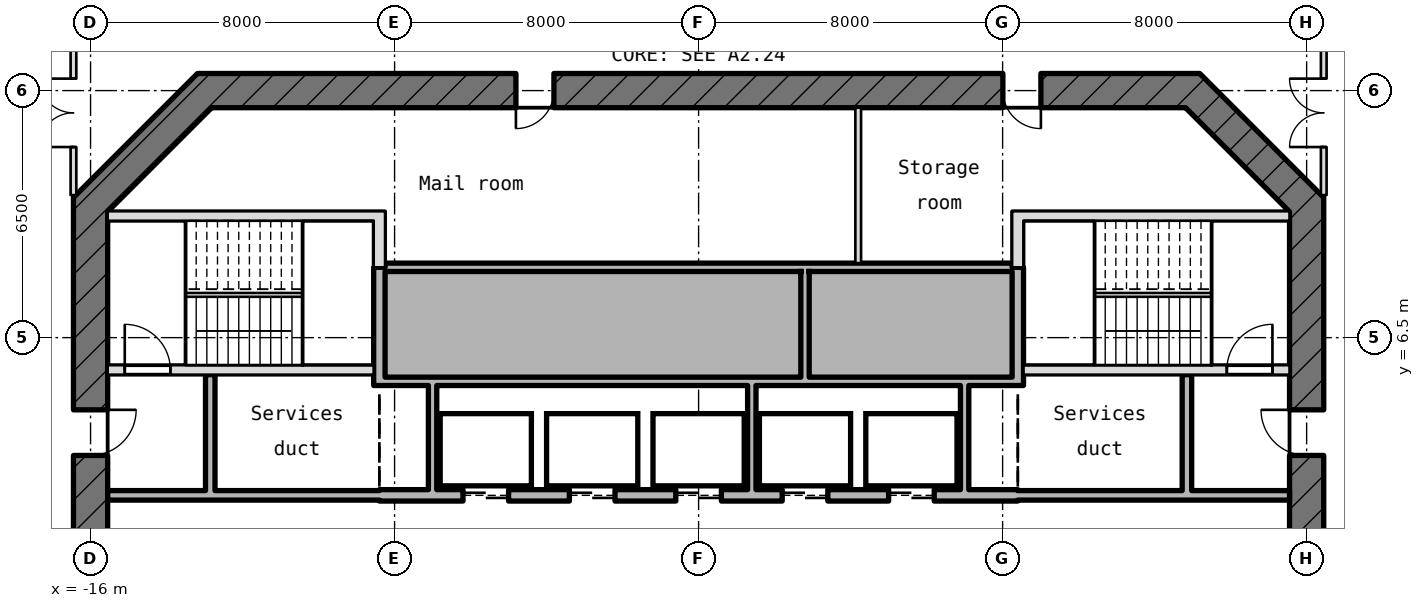
"""IFC4 building model, lengths in metres.
Left out: names, types, materials, properties, quantities, classifications, styles, units other than length and angle.
Written with IfcOpenShell. Run it as: python <this file> out.ifc"""

import sys

from ifc_helpers import new_model, si_unit, direction, frame, frame_2d, origin, place, context, subcontext, project, spatial, rectangle, extrude, element, fill, save


model = new_model("IFC4")
c1 = context("Model", 3, precision=1e-05, world=origin(), true_north=direction((0.0, 1.0)))
c2 = subcontext(c1, "Body", "Model", "MODEL_VIEW")
j1 = project(units=[si_unit("LENGTHUNIT", "METRE"), si_unit("PLANEANGLEUNIT", "RADIAN")], contexts=[c1])
p1 = place(None, origin())
s1 = spatial("IfcSite", under=j1, at=p1, CompositionType="ELEMENT")
p2 = place(p1, origin())
s2 = spatial("IfcBuilding", under=s1, at=p2, CompositionType="ELEMENT")
p3 = place(p2, frame((0.0, 0.0, 260.65)))
s3 = spatial("IfcBuildingStorey", under=s2, at=p3, CompositionType="ELEMENT", Elevation=260.65)
p4 = place(p3, frame((-14.512, 19.911, 0.0), z_axis=(0.0, 0.0, 1.0), x_axis=(-0.76563894676, -0.643270552104, 0.0)))
e1 = element("IfcWall", 1, at=p4, inside=s3, PredefinedType="SOLIDWALL", context=c2, shape_type="SweptSolid", body=[
    extrude(rectangle(XDim=10.58, YDim=0.3, at=frame_2d((5.29, 0.0))), origin(), (0.0, 0.0, 1.0), 3.97),
])
p5 = place(p4, frame((6.88, 0.0, 0.0)))
e2 = element("IfcOpeningElement", 2, at=p5, cuts=e1, PredefinedType="OPENING", context=c2, shape_type="SweptSolid", body=[
    extrude(rectangle(XDim=1.8, YDim=2.4, at=frame_2d((0.9, 1.2))), frame((0.0, 0.16, 0.0), z_axis=(0.0, -1.0, 0.0), x_axis=(1.0, 0.0, 0.0)), (0.0, 0.0, 1.0), 0.32),
])
p6 = place(p4, frame((4.28, 0.0, 0.9)))
e3 = element("IfcOpeningElement", 3, at=p6, cuts=e1, PredefinedType="OPENING", context=c2, shape_type="SweptSolid", body=[
    extrude(rectangle(XDim=2.0, YDim=1.5, at=frame_2d((1.0, 0.75))), frame((0.0, 0.16, 0.0), z_axis=(0.0, -1.0, 0.0), x_axis=(1.0, 0.0, 0.0)), (0.0, 0.0, 1.0), 0.32),
])
p7 = place(p3, frame((16.0, -10.186, -0.18), z_axis=(0.0, 0.0, 1.0), x_axis=(0.0, 1.0, 0.0)))
e4 = element("IfcWall", 4, at=p7, inside=s3, PredefinedType="SHEAR", context=c2, shape_type="SweptSolid", body=[
    extrude(rectangle(XDim=20.373, YDim=0.9, at=frame_2d((10.186, 0.0))), origin(), (0.0, 0.0, 1.0), 4.15),
])
p8 = place(p7, frame((8.986, 0.0, 0.18)))
e5 = element("IfcOpeningElement", 5, at=p8, cuts=e4, PredefinedType="OPENING", context=c2, shape_type="SweptSolid", body=[
    extrude(rectangle(XDim=2.4, YDim=2.1, at=frame_2d((1.2, 1.05))), frame((0.0, 0.46, 0.0), z_axis=(0.0, -1.0, 0.0), x_axis=(1.0, 0.0, 0.0)), (0.0, 0.0, 1.0), 0.92),
])
p9 = place(p7, frame((13.586, 0.0, 0.18)))
e6 = element("IfcOpeningElement", 6, at=p9, cuts=e4, PredefinedType="OPENING", context=c2, shape_type="SweptSolid", body=[
    extrude(rectangle(XDim=1.2, YDim=2.1, at=frame_2d((0.6, 1.05))), frame((0.0, 0.46, 0.0), z_axis=(0.0, -1.0, 0.0), x_axis=(1.0, 0.0, 0.0)), (0.0, 0.0, 1.0), 0.92),
])
p10 = place(p3, frame((16.132, 9.868, -0.18), z_axis=(0.0, 0.0, 1.0), x_axis=(-0.707106781187, 0.707106781187, 0.0)))
e7 = element("IfcWall", 7, at=p10, inside=s3, PredefinedType="SHEAR", context=c2, shape_type="SweptSolid", body=[
    extrude(rectangle(XDim=4.615, YDim=0.9, at=frame_2d((2.308, 0.0))), origin(), (0.0, 0.0, 1.0), 4.15),
])
p11 = place(p3, frame((13.186, 13.0, -0.18), z_axis=(0.0, 0.0, 1.0), x_axis=(-1.0, 0.0, 0.0)))
e8 = element("IfcWall", 8, at=p11, inside=s3, PredefinedType="SHEAR", context=c2, shape_type="SweptSolid", body=[
    extrude(rectangle(XDim=26.373, YDim=0.9, at=frame_2d((13.186, 0.0))), origin(), (0.0, 0.0, 1.0), 4.15),
])
p12 = place(p11, frame((16.993, 0.0, 0.18)))
e9 = element("IfcOpeningElement", 9, at=p12, cuts=e8, PredefinedType="OPENING", context=c2, shape_type="SweptSolid", body=[
    extrude(rectangle(XDim=1.0, YDim=2.1, at=frame_2d((0.5, 1.05))), frame((0.0, 0.46, 0.0), z_axis=(0.0, -1.0, 0.0), x_axis=(1.0, 0.0, 0.0)), (0.0, 0.0, 1.0), 0.92),
])
p13 = place(p11, frame((4.179, 0.0, 0.18)))
e10 = element("IfcOpeningElement", 10, at=p13, cuts=e8, PredefinedType="OPENING", context=c2, shape_type="SweptSolid", body=[
    extrude(rectangle(XDim=1.0, YDim=2.1, at=frame_2d((0.5, 1.05))), frame((0.0, 0.46, 0.0), z_axis=(0.0, -1.0, 0.0), x_axis=(1.0, 0.0, 0.0)), (0.0, 0.0, 1.0), 0.92),
])
p14 = place(p3, frame((-12.868, 13.132, -0.18), z_axis=(0.0, 0.0, 1.0), x_axis=(-0.707106781187, -0.707106781187, 0.0)))
e11 = element("IfcWall", 11, at=p14, inside=s3, PredefinedType="SHEAR", context=c2, shape_type="SweptSolid", body=[
    extrude(rectangle(XDim=4.615, YDim=0.9, at=frame_2d((2.308, 0.0))), origin(), (0.0, 0.0, 1.0), 4.15),
])
p15 = place(p3, frame((-16.0, 10.186, -0.18), z_axis=(0.0, 0.0, 1.0), x_axis=(0.0, -1.0, 0.0)))
e12 = element("IfcWall", 12, at=p15, inside=s3, PredefinedType="SHEAR", context=c2, shape_type="SweptSolid", body=[
    extrude(rectangle(XDim=20.373, YDim=0.9, at=frame_2d((10.186, 0.0))), origin(), (0.0, 0.0, 1.0), 4.15),
])
p16 = place(p15, frame((8.986, 0.0, 0.18)))
e13 = element("IfcOpeningElement", 13, at=p16, cuts=e12, PredefinedType="OPENING", context=c2, shape_type="SweptSolid", body=[
    extrude(rectangle(XDim=2.4, YDim=2.1, at=frame_2d((1.2, 1.05))), frame((0.0, 0.46, 0.0), z_axis=(0.0, -1.0, 0.0), x_axis=(1.0, 0.0, 0.0)), (0.0, 0.0, 1.0), 0.92),
])
p17 = place(p15, frame((5.586, 0.0, 0.18)))
e14 = element("IfcOpeningElement", 14, at=p17, cuts=e12, PredefinedType="OPENING", context=c2, shape_type="SweptSolid", body=[
    extrude(rectangle(XDim=1.2, YDim=2.1, at=frame_2d((0.6, 1.05))), frame((0.0, 0.46, 0.0), z_axis=(0.0, -1.0, 0.0), x_axis=(1.0, 0.0, 0.0)), (0.0, 0.0, 1.0), 0.92),
])
p18 = place(p3, frame((-15.55, 2.35, 0.0), z_axis=(0.0, 0.0, 1.0), x_axis=(1.0, 0.0, 0.0)))
e15 = element("IfcWall", 15, at=p18, inside=s3, PredefinedType="STANDARD", context=c2, shape_type="SweptSolid", body=[
    extrude(rectangle(XDim=7.15, YDim=0.25, at=frame_2d((3.575, 0.0))), origin(), (0.0, 0.0, 1.0), 3.97),
])
p19 = place(p3, frame((-8.4, 2.35, -0.18), z_axis=(0.0, 0.0, 1.0), x_axis=(1.0, 0.0, 0.0)))
e16 = element("IfcWall", 16, at=p19, inside=s3, PredefinedType="SHEAR", context=c2, shape_type="SweptSolid", body=[
    extrude(rectangle(XDim=16.8, YDim=0.3, at=frame_2d((8.4, 0.0))), origin(), (0.0, 0.0, 1.0), 4.15),
])
p20 = place(p19, frame((2.2, 0.0, 0.18)))
e17 = element("IfcOpeningElement", 17, at=p20, cuts=e16, PredefinedType="OPENING", context=c2, shape_type="SweptSolid", body=[
    extrude(rectangle(XDim=1.2, YDim=2.1, at=frame_2d((0.6, 1.05))), frame((0.0, 0.16, 0.0), z_axis=(0.0, -1.0, 0.0), x_axis=(1.0, 0.0, 0.0)), (0.0, 0.0, 1.0), 0.32),
])
p21 = place(p19, frame((5.0, 0.0, 0.18)))
e18 = element("IfcOpeningElement", 18, at=p21, cuts=e16, PredefinedType="OPENING", context=c2, shape_type="SweptSolid", body=[
    extrude(rectangle(XDim=1.2, YDim=2.1, at=frame_2d((0.6, 1.05))), frame((0.0, 0.16, 0.0), z_axis=(0.0, -1.0, 0.0), x_axis=(1.0, 0.0, 0.0)), (0.0, 0.0, 1.0), 0.32),
])
p22 = place(p19, frame((7.8, 0.0, 0.18)))
e19 = element("IfcOpeningElement", 19, at=p22, cuts=e16, PredefinedType="OPENING", context=c2, shape_type="SweptSolid", body=[
    extrude(rectangle(XDim=1.2, YDim=2.1, at=frame_2d((0.6, 1.05))), frame((0.0, 0.16, 0.0), z_axis=(0.0, -1.0, 0.0), x_axis=(1.0, 0.0, 0.0)), (0.0, 0.0, 1.0), 0.32),
])
p23 = place(p19, frame((10.6, 0.0, 0.18)))
e20 = element("IfcOpeningElement", 20, at=p23, cuts=e16, PredefinedType="OPENING", context=c2, shape_type="SweptSolid", body=[
    extrude(rectangle(XDim=1.2, YDim=2.1, at=frame_2d((0.6, 1.05))), frame((0.0, 0.16, 0.0), z_axis=(0.0, -1.0, 0.0), x_axis=(1.0, 0.0, 0.0)), (0.0, 0.0, 1.0), 0.32),
])
p24 = place(p19, frame((13.4, 0.0, 0.18)))
e21 = element("IfcOpeningElement", 21, at=p24, cuts=e16, PredefinedType="OPENING", context=c2, shape_type="SweptSolid", body=[
    extrude(rectangle(XDim=1.2, YDim=2.1, at=frame_2d((0.6, 1.05))), frame((0.0, 0.16, 0.0), z_axis=(0.0, -1.0, 0.0), x_axis=(1.0, 0.0, 0.0)), (0.0, 0.0, 1.0), 0.32),
])
p25 = place(p3, frame((8.4, 2.35, 0.0), z_axis=(0.0, 0.0, 1.0), x_axis=(1.0, 0.0, 0.0)))
e22 = element("IfcWall", 22, at=p25, inside=s3, PredefinedType="STANDARD", context=c2, shape_type="SweptSolid", body=[
    extrude(rectangle(XDim=7.15, YDim=0.25, at=frame_2d((3.575, 0.0))), origin(), (0.0, 0.0, 1.0), 3.97),
])
p26 = place(p3, frame((-8.25, 5.35, 0.0), z_axis=(0.0, 0.0, 1.0), x_axis=(1.0, 0.0, 0.0)))
e23 = element("IfcWall", 23, at=p26, inside=s3, PredefinedType="STANDARD", context=c2, shape_type="SweptSolid", body=[
    extrude(rectangle(XDim=16.5, YDim=0.22, at=frame_2d((8.25, 0.0))), origin(), (0.0, 0.0, 1.0), 3.97),
])
p27 = place(p3, frame((-15.55, 5.65, -0.18), z_axis=(0.0, 0.0, 1.0), x_axis=(1.0, 0.0, 0.0)))
e24 = element("IfcWall", 24, at=p27, inside=s3, PredefinedType="SHEAR", context=c2, shape_type="SweptSolid", body=[
    extrude(rectangle(XDim=7.0, YDim=0.25, at=frame_2d((3.5, 0.0))), origin(), (0.0, 0.0, 1.0), 4.15),
])
p28 = place(p27, frame((0.45, 0.0, 0.18)))
e25 = element("IfcOpeningElement", 25, at=p28, cuts=e24, PredefinedType="OPENING", context=c2, shape_type="SweptSolid", body=[
    extrude(rectangle(XDim=1.2, YDim=2.1, at=frame_2d((0.6, 1.05))), frame((0.0, 0.135, 0.0), z_axis=(0.0, -1.0, 0.0), x_axis=(1.0, 0.0, 0.0)), (0.0, 0.0, 1.0), 0.27),
])
p29 = place(p3, frame((8.55, 5.65, -0.18), z_axis=(0.0, 0.0, 1.0), x_axis=(1.0, 0.0, 0.0)))
e26 = element("IfcWall", 26, at=p29, inside=s3, PredefinedType="SHEAR", context=c2, shape_type="SweptSolid", body=[
    extrude(rectangle(XDim=7.0, YDim=0.25, at=frame_2d((3.5, 0.0))), origin(), (0.0, 0.0, 1.0), 4.15),
])
p30 = place(p29, frame((5.35, 0.0, 0.18)))
e27 = element("IfcOpeningElement", 27, at=p30, cuts=e26, PredefinedType="OPENING", context=c2, shape_type="SweptSolid", body=[
    extrude(rectangle(XDim=1.2, YDim=2.1, at=frame_2d((0.6, 1.05))), frame((0.0, 0.135, 0.0), z_axis=(0.0, -1.0, 0.0), x_axis=(1.0, 0.0, 0.0)), (0.0, 0.0, 1.0), 0.27),
])
p31 = place(p3, frame((-8.25, 8.35, 0.0), z_axis=(0.0, 0.0, 1.0), x_axis=(1.0, 0.0, 0.0)))
e28 = element("IfcWall", 28, at=p31, inside=s3, PredefinedType="STANDARD", context=c2, shape_type="SweptSolid", body=[
    extrude(rectangle(XDim=16.5, YDim=0.22, at=frame_2d((8.25, 0.0))), origin(), (0.0, 0.0, 1.0), 3.97),
])
for number, where, z_axis, x_axis in (
    (29, (-15.55, 9.7, -0.18), (0.0, 0.0, 1.0), (1.0, 0.0, 0.0)),
    (30, (8.55, 9.7, -0.18), (0.0, 0.0, 1.0), (1.0, 0.0, 0.0)),
):
    element("IfcWall", number, at=place(p3, frame(where, z_axis=z_axis, x_axis=x_axis)), inside=s3, PredefinedType="SHEAR", context=c2, shape_type="SweptSolid", body=[
        extrude(rectangle(XDim=7.0, YDim=0.25, at=frame_2d((3.5, 0.0))), origin(), (0.0, 0.0, 1.0), 4.15),
    ])
p32 = place(p3, frame((-12.85, 2.475, 0.0), z_axis=(0.0, 0.0, 1.0), x_axis=(0.0, 1.0, 0.0)))
e31 = element("IfcWall", 31, at=p32, inside=s3, PredefinedType="STANDARD", context=c2, shape_type="SweptSolid", body=[
    extrude(rectangle(XDim=3.05, YDim=0.25, at=frame_2d((1.525, 0.0))), origin(), (0.0, 0.0, 1.0), 3.97),
])
p33 = place(p3, frame((-8.4, 5.24, -0.18), z_axis=(0.0, 0.0, 1.0), x_axis=(0.0, 1.0, 0.0)))
e32 = element("IfcWall", 32, at=p33, inside=s3, PredefinedType="SHEAR", context=c2, shape_type="SweptSolid", body=[
    extrude(rectangle(XDim=3.11, YDim=0.3, at=frame_2d((1.555, 0.0))), origin(), (0.0, 0.0, 1.0), 4.15),
])
p34 = place(p3, frame((-8.4, 8.35, -0.18), z_axis=(0.0, 0.0, 1.0), x_axis=(0.0, 1.0, 0.0)))
e33 = element("IfcWall", 33, at=p34, inside=s3, PredefinedType="SHEAR", context=c2, shape_type="SweptSolid", body=[
    extrude(rectangle(XDim=1.475, YDim=0.3, at=frame_2d((0.737, 0.0))), origin(), (0.0, 0.0, 1.0), 4.15),
])
for number, where, z_axis, x_axis in (
    (34, (-7.0, 2.5, 0.0), (0.0, 0.0, 1.0), (0.0, 1.0, 0.0)),
    (35, (1.4, 2.5, 0.0), (0.0, 0.0, 1.0), (0.0, 1.0, 0.0)),
):
    element("IfcWall", number, at=place(p3, frame(where, z_axis=z_axis, x_axis=x_axis)), inside=s3, PredefinedType="STANDARD", context=c2, shape_type="SweptSolid", body=[
        extrude(rectangle(XDim=2.74, YDim=0.22, at=frame_2d((1.37, 0.0))), origin(), (0.0, 0.0, 1.0), 3.97),
    ])
p35 = place(p3, frame((2.8, 5.46, 0.0), z_axis=(0.0, 0.0, 1.0), x_axis=(0.0, 1.0, 0.0)))
e36 = element("IfcWall", 36, at=p35, inside=s3, PredefinedType="STANDARD", context=c2, shape_type="SweptSolid", body=[
    extrude(rectangle(XDim=2.78, YDim=0.22, at=frame_2d((1.39, 0.0))), origin(), (0.0, 0.0, 1.0), 3.97),
])
p36 = place(p3, frame((4.2, 8.46, 0.0), z_axis=(0.0, 0.0, 1.0), x_axis=(0.0, 1.0, 0.0)))
e37 = element("IfcWall", 37, at=p36, inside=s3, PredefinedType="PARTITIONING", context=c2, shape_type="SweptSolid", body=[
    extrude(rectangle(XDim=4.09, YDim=0.15, at=frame_2d((2.045, 0.0))), origin(), (0.0, 0.0, 1.0), 3.97),
])
p37 = place(p3, frame((7.0, 2.5, 0.0), z_axis=(0.0, 0.0, 1.0), x_axis=(0.0, 1.0, 0.0)))
e38 = element("IfcWall", 38, at=p37, inside=s3, PredefinedType="STANDARD", context=c2, shape_type="SweptSolid", body=[
    extrude(rectangle(XDim=2.74, YDim=0.22, at=frame_2d((1.37, 0.0))), origin(), (0.0, 0.0, 1.0), 3.97),
])
p38 = place(p3, frame((8.4, 5.24, -0.18), z_axis=(0.0, 0.0, 1.0), x_axis=(0.0, 1.0, 0.0)))
e39 = element("IfcWall", 39, at=p38, inside=s3, PredefinedType="SHEAR", context=c2, shape_type="SweptSolid", body=[
    extrude(rectangle(XDim=3.11, YDim=0.3, at=frame_2d((1.555, 0.0))), origin(), (0.0, 0.0, 1.0), 4.15),
])
p39 = place(p3, frame((8.4, 8.35, -0.18), z_axis=(0.0, 0.0, 1.0), x_axis=(0.0, 1.0, 0.0)))
e40 = element("IfcWall", 40, at=p39, inside=s3, PredefinedType="SHEAR", context=c2, shape_type="SweptSolid", body=[
    extrude(rectangle(XDim=1.475, YDim=0.3, at=frame_2d((0.737, 0.0))), origin(), (0.0, 0.0, 1.0), 4.15),
])
p40 = place(p3, frame((12.85, 2.475, 0.0), z_axis=(0.0, 0.0, 1.0), x_axis=(0.0, 1.0, 0.0)))
e41 = element("IfcWall", 41, at=p40, inside=s3, PredefinedType="STANDARD", context=c2, shape_type="SweptSolid", body=[
    extrude(rectangle(XDim=3.05, YDim=0.25, at=frame_2d((1.525, 0.0))), origin(), (0.0, 0.0, 1.0), 3.97),
])
p41 = place(p3, frame((-16.45, 10.25, 0.0), z_axis=(0.0, 0.0, 1.0), x_axis=(0.0, 1.0, 0.0)))
e42 = element("IfcWall", 42, at=p41, inside=s3, PredefinedType="PARTITIONING", context=c2, shape_type="SweptSolid", body=[
    extrude(rectangle(XDim=7.13, YDim=0.15, at=frame_2d((3.565, 0.0))), origin(), (0.0, 0.0, 1.0), 3.97),
])
p42 = place(p41, frame((1.265, 0.0, 0.0)))
e43 = element("IfcOpeningElement", 43, at=p42, cuts=e42, PredefinedType="OPENING", context=c2, shape_type="SweptSolid", body=[
    extrude(rectangle(XDim=1.8, YDim=2.1, at=frame_2d((0.9, 1.05))), frame((0.0, 0.085, 0.0), z_axis=(0.0, -1.0, 0.0), x_axis=(1.0, 0.0, 0.0)), (0.0, 0.0, 1.0), 0.17),
])
p43 = place(p3, frame((16.45, 10.25, 0.0), z_axis=(0.0, 0.0, 1.0), x_axis=(0.0, 1.0, 0.0)))
e44 = element("IfcWall", 44, at=p43, inside=s3, PredefinedType="PARTITIONING", context=c2, shape_type="SweptSolid", body=[
    extrude(rectangle(XDim=7.13, YDim=0.15, at=frame_2d((3.565, 0.0))), origin(), (0.0, 0.0, 1.0), 3.97),
])
p44 = place(p43, frame((1.265, 0.0, 0.0)))
e45 = element("IfcOpeningElement", 45, at=p44, cuts=e44, PredefinedType="OPENING", context=c2, shape_type="SweptSolid", body=[
    extrude(rectangle(XDim=1.8, YDim=2.1, at=frame_2d((0.9, 1.05))), frame((0.0, 0.085, 0.0), z_axis=(0.0, -1.0, 0.0), x_axis=(1.0, 0.0, 0.0)), (0.0, 0.0, 1.0), 0.17),
])
p45 = place(p20, origin())
e46 = element("IfcDoor", 46, at=p45, inside=s3, OperationType="DOUBLE_DOOR_SLIDING", PredefinedType="DOOR", context=c2, shape_type="SweptSolid", body=[
    extrude(rectangle(XDim=1.2, YDim=2.1, at=frame_2d((0.6, 1.05))), frame((0.0, 0.025, 0.0), z_axis=(0.0, -1.0, 0.0), x_axis=(1.0, 0.0, 0.0)), (0.0, 0.0, 1.0), 0.05),
])
fill(e17, e46)
p46 = place(p21, origin())
e47 = element("IfcDoor", 47, at=p46, inside=s3, OperationType="DOUBLE_DOOR_SLIDING", PredefinedType="DOOR", context=c2, shape_type="SweptSolid", body=[
    extrude(rectangle(XDim=1.2, YDim=2.1, at=frame_2d((0.6, 1.05))), frame((0.0, 0.025, 0.0), z_axis=(0.0, -1.0, 0.0), x_axis=(1.0, 0.0, 0.0)), (0.0, 0.0, 1.0), 0.05),
])
fill(e18, e47)
p47 = place(p22, origin())
e48 = element("IfcDoor", 48, at=p47, inside=s3, OperationType="DOUBLE_DOOR_SLIDING", PredefinedType="DOOR", context=c2, shape_type="SweptSolid", body=[
    extrude(rectangle(XDim=1.2, YDim=2.1, at=frame_2d((0.6, 1.05))), frame((0.0, 0.025, 0.0), z_axis=(0.0, -1.0, 0.0), x_axis=(1.0, 0.0, 0.0)), (0.0, 0.0, 1.0), 0.05),
])
fill(e19, e48)
p48 = place(p23, origin())
e49 = element("IfcDoor", 49, at=p48, inside=s3, OperationType="DOUBLE_DOOR_SLIDING", PredefinedType="DOOR", context=c2, shape_type="SweptSolid", body=[
    extrude(rectangle(XDim=1.2, YDim=2.1, at=frame_2d((0.6, 1.05))), frame((0.0, 0.025, 0.0), z_axis=(0.0, -1.0, 0.0), x_axis=(1.0, 0.0, 0.0)), (0.0, 0.0, 1.0), 0.05),
])
fill(e20, e49)
p49 = place(p24, origin())
e50 = element("IfcDoor", 50, at=p49, inside=s3, OperationType="DOUBLE_DOOR_SLIDING", PredefinedType="DOOR", context=c2, shape_type="SweptSolid", body=[
    extrude(rectangle(XDim=1.2, YDim=2.1, at=frame_2d((0.6, 1.05))), frame((0.0, 0.025, 0.0), z_axis=(0.0, -1.0, 0.0), x_axis=(1.0, 0.0, 0.0)), (0.0, 0.0, 1.0), 0.05),
])
fill(e21, e50)
p50 = place(p28, origin())
e51 = element("IfcDoor", 51, at=p50, inside=s3, OperationType="SINGLE_SWING_RIGHT", PredefinedType="DOOR", context=c2, shape_type="SweptSolid", body=[
    extrude(rectangle(XDim=1.2, YDim=2.1, at=frame_2d((0.6, 1.05))), frame((0.0, 0.025, 0.0), z_axis=(0.0, -1.0, 0.0), x_axis=(1.0, 0.0, 0.0)), (0.0, 0.0, 1.0), 0.05),
])
fill(e25, e51)
p51 = place(p30, origin())
e52 = element("IfcDoor", 52, at=p51, inside=s3, OperationType="SINGLE_SWING_RIGHT", PredefinedType="DOOR", context=c2, shape_type="SweptSolid", body=[
    extrude(rectangle(XDim=1.2, YDim=2.1, at=frame_2d((0.6, 1.05))), frame((0.0, 0.025, 0.0), z_axis=(0.0, -1.0, 0.0), x_axis=(1.0, 0.0, 0.0)), (0.0, 0.0, 1.0), 0.05),
])
fill(e27, e52)
p52 = place(p17, origin())
e53 = element("IfcDoor", 53, at=p52, inside=s3, OperationType="SINGLE_SWING_RIGHT", PredefinedType="DOOR", context=c2, shape_type="SweptSolid", body=[
    extrude(rectangle(XDim=1.2, YDim=2.1, at=frame_2d((0.6, 1.05))), frame((0.0, 0.025, 0.0), z_axis=(0.0, -1.0, 0.0), x_axis=(1.0, 0.0, 0.0)), (0.0, 0.0, 1.0), 0.05),
])
fill(e14, e53)
p53 = place(p9, origin())
e54 = element("IfcDoor", 54, at=p53, inside=s3, OperationType="SINGLE_SWING_RIGHT", PredefinedType="DOOR", context=c2, shape_type="SweptSolid", body=[
    extrude(rectangle(XDim=1.2, YDim=2.1, at=frame_2d((0.6, 1.05))), frame((0.0, 0.025, 0.0), z_axis=(0.0, -1.0, 0.0), x_axis=(1.0, 0.0, 0.0)), (0.0, 0.0, 1.0), 0.05),
])
fill(e6, e54)
p54 = place(p12, origin())
e55 = element("IfcDoor", 55, at=p54, inside=s3, OperationType="SINGLE_SWING_RIGHT", PredefinedType="DOOR", context=c2, shape_type="SweptSolid", body=[
    extrude(rectangle(XDim=1.0, YDim=2.1, at=frame_2d((0.5, 1.05))), frame((0.0, 0.025, 0.0), z_axis=(0.0, -1.0, 0.0), x_axis=(1.0, 0.0, 0.0)), (0.0, 0.0, 1.0), 0.05),
])
fill(e9, e55)
p55 = place(p13, origin())
e56 = element("IfcDoor", 56, at=p55, inside=s3, OperationType="SINGLE_SWING_RIGHT", PredefinedType="DOOR", context=c2, shape_type="SweptSolid", body=[
    extrude(rectangle(XDim=1.0, YDim=2.1, at=frame_2d((0.5, 1.05))), frame((0.0, 0.025, 0.0), z_axis=(0.0, -1.0, 0.0), x_axis=(1.0, 0.0, 0.0)), (0.0, 0.0, 1.0), 0.05),
])
fill(e10, e56)
p56 = place(p42, origin())
e57 = element("IfcDoor", 57, at=p56, inside=s3, OperationType="DOUBLE_DOOR_SINGLE_SWING", PredefinedType="DOOR", context=c2, shape_type="SweptSolid", body=[
    extrude(rectangle(XDim=1.8, YDim=2.1, at=frame_2d((0.9, 1.05))), frame((0.0, 0.025, 0.0), z_axis=(0.0, -1.0, 0.0), x_axis=(1.0, 0.0, 0.0)), (0.0, 0.0, 1.0), 0.05),
])
fill(e43, e57)
p57 = place(p44, origin())
e58 = element("IfcDoor", 58, at=p57, inside=s3, OperationType="DOUBLE_DOOR_SINGLE_SWING", PredefinedType="DOOR", context=c2, shape_type="SweptSolid", body=[
    extrude(rectangle(XDim=1.8, YDim=2.1, at=frame_2d((0.9, 1.05))), frame((0.0, 0.025, 0.0), z_axis=(0.0, -1.0, 0.0), x_axis=(1.0, 0.0, 0.0)), (0.0, 0.0, 1.0), 0.05),
])
fill(e45, e58)
save(model, sys.argv[1])
